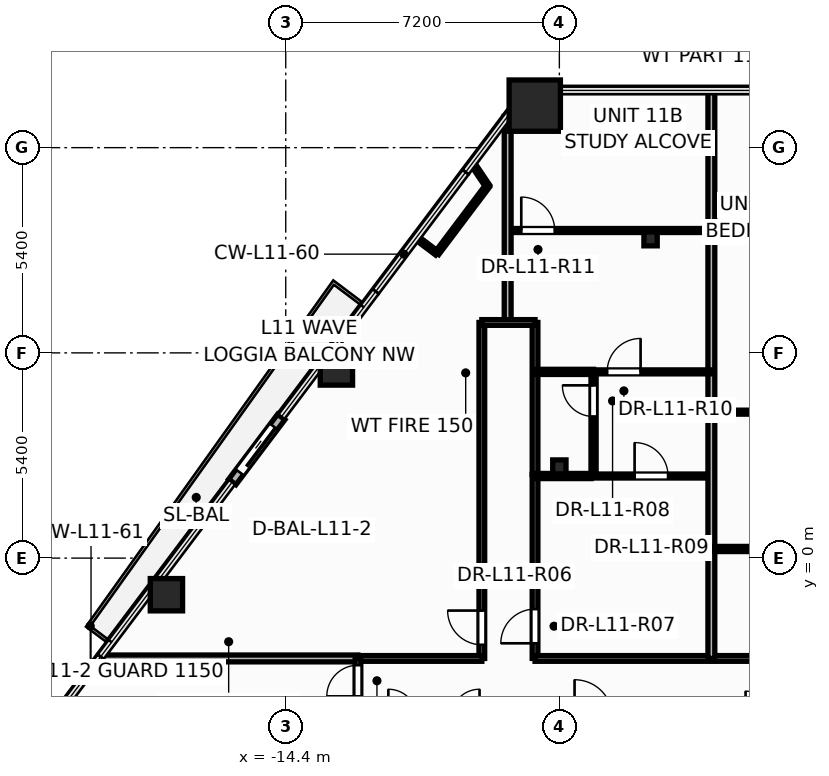
"""IFC4 building model, lengths in metres.
Left out: names, types, materials, properties, quantities, classifications, styles, units other than length and angle.
Written with IfcOpenShell. Run it as: python <this file> out.ifc"""

import sys

from ifc_helpers import new_model, si_unit, direction, frame, frame_2d, origin, origin_2d, place, context, subcontext, project, spatial, rectangle, hollow_rectangle, hollow_circle, i_section, extrude, element, fill, save


model = new_model("IFC4")
c1 = context("Model", 3, precision=1e-05, world=origin(), true_north=direction((0.0, 1.0)))
c2 = subcontext(c1, "Body", "Model", "MODEL_VIEW")
j1 = project(units=[si_unit("LENGTHUNIT", "METRE"), si_unit("PLANEANGLEUNIT", "RADIAN")], contexts=[c1])
p1 = place(None, origin())
s1 = spatial("IfcSite", under=j1, at=p1, CompositionType="ELEMENT")
p2 = place(p1, origin())
s2 = spatial("IfcBuilding", under=s1, at=p2, CompositionType="ELEMENT")
p3 = place(p2, frame((0.0, 0.0, 45.9)))
s3 = spatial("IfcBuildingStorey", under=s2, at=p3, CompositionType="ELEMENT", Elevation=45.9)
p4 = place(p3, frame((-7.847, 11.906, 0.0), z_axis=(0.0, 0.0, 1.0), x_axis=(1.0, 0.0, 0.0)))
e1 = element("IfcColumn", 1, at=p4, inside=s3, PredefinedType="COLUMN", context=c2, shape_type="SweptSolid", body=[
    extrude(hollow_rectangle(XDim=1.35, YDim=1.35, WallThickness=0.065, at=origin_2d()), origin(), (0.0, 0.0, 1.0), 3.6),
])
for number, where, z_axis, x_axis in (
    (2, (-13.066, 4.976, 0.0), (0.0, 0.0, 1.0), (1.0, 0.0, 0.0)),
    (3, (-17.54, -0.963, 0.0), (0.0, 0.0, 1.0), (1.0, 0.0, 0.0)),
):
    element("IfcColumn", number, at=place(p3, frame(where, z_axis=z_axis, x_axis=x_axis)), inside=s3, PredefinedType="COLUMN", context=c2, shape_type="SweptSolid", body=[
        extrude(hollow_circle(Radius=0.425, WallThickness=0.038, at=origin_2d()), origin(), (0.0, 0.0, 1.0), 3.6),
    ])
for number, where, z_axis, x_axis in (
    (4, (-7.2, 2.4, 0.0), (0.0, 0.0, 1.0), (1.0, 0.0, 0.0)),
    (5, (-4.8, 8.4, 0.0), (0.0, 0.0, 1.0), (1.0, 0.0, 0.0)),
):
    element("IfcColumn", number, at=place(p3, frame(where, z_axis=z_axis, x_axis=x_axis)), inside=s3, PredefinedType="COLUMN", context=c2, shape_type="SweptSolid", body=[
        extrude(i_section(OverallWidth=0.35, OverallDepth=0.367, WebThickness=0.025, FlangeThickness=0.032, at=origin_2d()), origin(), (0.0, 0.0, 1.0), 3.6),
    ])
p5 = place(p3, frame((-14.518, 3.713, -0.015), z_axis=(0.0, 0.0, 1.0), x_axis=(-0.601696267697, -0.79872498486, 0.0)))
e6 = element("IfcWall", 6, at=p5, inside=s3, PredefinedType="STANDARD", context=c2, shape_type="SweptSolid", body=[
    extrude(rectangle(XDim=2.14, YDim=0.24, at=frame_2d((1.07, 0.0))), origin(), (0.0, 0.0, 1.0), 2.728),
])
p6 = place(p5, frame((0.32, 0.0, 0.015)))
e7 = element("IfcOpeningElement", 7, at=p6, cuts=e6, PredefinedType="OPENING", context=c2, shape_type="SweptSolid", body=[
    extrude(rectangle(XDim=1.506, YDim=2.204, at=frame_2d((0.75, 1.102))), frame((0.0, 0.13, 0.0), z_axis=(0.0, -1.0, 0.0), x_axis=(1.0, 0.0, 0.0)), (0.0, 0.0, 1.0), 0.26),
])
p7 = place(p3, frame((-9.24, -2.64, 0.0), z_axis=(0.0, 0.0, 1.0), x_axis=(0.0, 1.0, 0.0)))
e8 = element("IfcWall", 8, at=p7, inside=s3, PredefinedType="PARTITIONING", context=c2, shape_type="SweptSolid", body=[
    extrude(rectangle(XDim=8.84, YDim=0.15, at=frame_2d((4.42, 0.0))), origin(), (0.0, 0.0, 1.0), 2.509),
])
p8 = place(p7, frame((0.359, 0.0, 0.0)))
e9 = element("IfcOpeningElement", 9, at=p8, cuts=e8, PredefinedType="OPENING", context=c2, shape_type="SweptSolid", body=[
    extrude(rectangle(XDim=0.906, YDim=2.104, at=frame_2d((0.45, 1.052))), frame((0.0, 0.085, 0.0), z_axis=(0.0, -1.0, 0.0), x_axis=(1.0, 0.0, 0.0)), (0.0, 0.0, 1.0), 0.17),
])
p9 = place(p3, frame((-19.304, -2.64, 0.0), z_axis=(0.0, 0.0, 1.0), x_axis=(1.0, 0.0, 0.0)))
e10 = element("IfcWall", 10, at=p9, inside=s3, PredefinedType="PARTITIONING", context=c2, shape_type="SweptSolid", body=[
    extrude(rectangle(XDim=6.804, YDim=0.18, at=frame_2d((3.402, 0.0))), origin(), (0.0, 0.0, 1.0), 2.713),
])
p10 = place(p3, frame((-8.56, 8.62, 0.0), z_axis=(0.0, 0.0, 1.0), x_axis=(1.0, 0.0, 0.0)))
e11 = element("IfcWall", 11, at=p10, inside=s3, PredefinedType="PARTITIONING", context=c2, shape_type="SweptSolid", body=[
    extrude(rectangle(XDim=5.36, YDim=0.105, at=frame_2d((2.68, 0.0))), origin(), (0.0, 0.0, 1.0), 2.509),
])
p11 = place(p10, frame((0.358, 0.0, 0.0)))
e12 = element("IfcOpeningElement", 12, at=p11, cuts=e11, PredefinedType="OPENING", context=c2, shape_type="SweptSolid", body=[
    extrude(rectangle(XDim=0.886, YDim=2.104, at=frame_2d((0.44, 1.052))), frame((0.0, 0.062, 0.0), z_axis=(0.0, -1.0, 0.0), x_axis=(1.0, 0.0, 0.0)), (0.0, 0.0, 1.0), 0.125),
])
p12 = place(p3, frame((-7.84, -2.64, 0.0), z_axis=(0.0, 0.0, 1.0), x_axis=(0.0, 1.0, 0.0)))
e13 = element("IfcWall", 13, at=p12, inside=s3, PredefinedType="PARTITIONING", context=c2, shape_type="SweptSolid", body=[
    extrude(rectangle(XDim=4.84, YDim=0.15, at=frame_2d((2.42, 0.0))), origin(), (0.0, 0.0, 1.0), 2.509),
])
p13 = place(p12, frame((0.398, 0.0, 0.0)))
e14 = element("IfcOpeningElement", 14, at=p13, cuts=e13, PredefinedType="OPENING", context=c2, shape_type="SweptSolid", body=[
    extrude(rectangle(XDim=0.906, YDim=2.104, at=frame_2d((0.45, 1.052))), frame((0.0, 0.085, 0.0), z_axis=(0.0, -1.0, 0.0), x_axis=(1.0, 0.0, 0.0)), (0.0, 0.0, 1.0), 0.17),
])
p14 = place(p3, frame((-7.84, -2.64, 0.0), z_axis=(0.0, 0.0, 1.0), x_axis=(1.0, 0.0, 0.0)))
e15 = element("IfcWall", 15, at=p14, inside=s3, PredefinedType="PARTITIONING", context=c2, shape_type="SweptSolid", body=[
    extrude(rectangle(XDim=7.0, YDim=0.15, at=frame_2d((3.5, 0.0))), origin(), (0.0, 0.0, 1.0), 2.325),
])
p15 = place(p3, frame((-3.2, 3.8, 0.0), z_axis=(0.0, 0.0, 1.0), x_axis=(0.0, 1.0, 0.0)))
e16 = element("IfcWall", 16, at=p15, inside=s3, PredefinedType="PARTITIONING", context=c2, shape_type="SweptSolid", body=[
    extrude(rectangle(XDim=8.506, YDim=0.18, at=frame_2d((4.253, 0.0))), origin(), (0.0, 0.0, 1.0), 2.509),
])
p16 = place(p3, frame((-12.5, -2.64, 0.0), z_axis=(0.0, 0.0, 1.0), x_axis=(1.0, 0.0, 0.0)))
e17 = element("IfcWall", 17, at=p16, inside=s3, PredefinedType="PARTITIONING", context=c2, shape_type="SweptSolid", body=[
    extrude(rectangle(XDim=3.26, YDim=0.15, at=frame_2d((1.63, 0.0))), origin(), (0.0, 0.0, 1.0), 3.35),
])
p17 = place(p3, frame((-6.36, 2.16, 0.0), z_axis=(0.0, 0.0, 1.0), x_axis=(1.0, 0.0, 0.0)))
e18 = element("IfcWall", 18, at=p17, inside=s3, PredefinedType="PARTITIONING", context=c2, shape_type="SweptSolid", body=[
    extrude(rectangle(XDim=3.16, YDim=0.105, at=frame_2d((1.58, 0.0))), origin(), (0.0, 0.0, 1.0), 2.325),
])
p18 = place(p17, frame((1.14, 0.0, 0.0)))
e19 = element("IfcOpeningElement", 19, at=p18, cuts=e18, PredefinedType="OPENING", context=c2, shape_type="SweptSolid", body=[
    extrude(rectangle(XDim=0.886, YDim=2.104, at=frame_2d((0.44, 1.052))), frame((0.0, 0.062, 0.0), z_axis=(0.0, -1.0, 0.0), x_axis=(1.0, 0.0, 0.0)), (0.0, 0.0, 1.0), 0.125),
])
p19 = place(p3, frame((-6.3, 4.9, 0.0), z_axis=(0.0, 0.0, 1.0), x_axis=(1.0, 0.0, 0.0)))
e20 = element("IfcWall", 20, at=p19, inside=s3, PredefinedType="PARTITIONING", context=c2, shape_type="SweptSolid", body=[
    extrude(rectangle(XDim=3.1, YDim=0.105, at=frame_2d((1.55, 0.0))), origin(), (0.0, 0.0, 1.0), 2.509),
])
p20 = place(p19, frame((0.358, 0.0, 0.0)))
e21 = element("IfcOpeningElement", 21, at=p20, cuts=e20, PredefinedType="OPENING", context=c2, shape_type="SweptSolid", body=[
    extrude(rectangle(XDim=0.886, YDim=2.104, at=frame_2d((0.44, 1.052))), frame((0.0, 0.062, 0.0), z_axis=(0.0, -1.0, 0.0), x_axis=(1.0, 0.0, 0.0)), (0.0, 0.0, 1.0), 0.125),
])
p21 = place(p3, frame((-8.56, 6.2, 0.0), z_axis=(0.0, 0.0, 1.0), x_axis=(0.0, 1.0, 0.0)))
e22 = element("IfcWall", 22, at=p21, inside=s3, PredefinedType="PARTITIONING", context=c2, shape_type="SweptSolid", body=[
    extrude(rectangle(XDim=5.425, YDim=0.18, at=frame_2d((2.712, 0.0))), origin(), (0.0, 0.0, 1.0), 2.509),
])
p22 = place(p3, frame((-3.2, -2.64, 0.0), z_axis=(0.0, 0.0, 1.0), x_axis=(0.0, 1.0, 0.0)))
e23 = element("IfcWall", 23, at=p22, inside=s3, PredefinedType="PARTITIONING", context=c2, shape_type="SweptSolid", body=[
    extrude(rectangle(XDim=6.438, YDim=0.18, at=frame_2d((3.219, 0.0))), origin(), (0.0, 0.0, 1.0), 2.325),
])
p23 = place(p3, frame((-7.84, 2.202, 0.0), z_axis=(0.0, 0.0, 1.0), x_axis=(0.0, 1.0, 0.0)))
e24 = element("IfcWall", 24, at=p23, inside=s3, PredefinedType="PARTITIONING", context=c2, shape_type="SweptSolid", body=[
    extrude(rectangle(XDim=3.998, YDim=0.15, at=frame_2d((1.999, 0.0))), origin(), (0.0, 0.0, 1.0), 2.509),
])
p24 = place(p3, frame((-6.3, 2.16, 0.0), z_axis=(0.0, 0.0, 1.0), x_axis=(0.0, 1.0, 0.0)))
e25 = element("IfcWall", 25, at=p24, inside=s3, PredefinedType="PARTITIONING", context=c2, shape_type="SweptSolid", body=[
    extrude(rectangle(XDim=2.74, YDim=0.135, at=frame_2d((1.37, 0.0))), origin(), (0.0, 0.0, 1.0), 2.325),
])
p25 = place(p24, frame((1.566, 0.0, 0.0)))
e26 = element("IfcOpeningElement", 26, at=p25, cuts=e25, PredefinedType="OPENING", context=c2, shape_type="SweptSolid", body=[
    extrude(rectangle(XDim=0.826, YDim=2.104, at=frame_2d((0.41, 1.052))), frame((0.0, 0.078, 0.0), z_axis=(0.0, -1.0, 0.0), x_axis=(1.0, 0.0, 0.0)), (0.0, 0.0, 1.0), 0.155),
])
p26 = place(p3, frame((-3.2, 0.24, 0.0), z_axis=(0.0, 0.0, 1.0), x_axis=(1.0, 0.0, 0.0)))
e27 = element("IfcWall", 27, at=p26, inside=s3, PredefinedType="PARTITIONING", context=c2, shape_type="SweptSolid", body=[
    extrude(rectangle(XDim=2.3, YDim=0.135, at=frame_2d((1.15, 0.0))), origin(), (0.0, 0.0, 1.0), 3.35),
])
p27 = place(p3, frame((-3.2, 3.84, 0.0), z_axis=(0.0, 0.0, 1.0), x_axis=(1.0, 0.0, 0.0)))
e28 = element("IfcWall", 28, at=p27, inside=s3, PredefinedType="PARTITIONING", context=c2, shape_type="SweptSolid", body=[
    extrude(rectangle(XDim=2.758, YDim=0.105, at=frame_2d((1.379, 0.0))), origin(), (0.0, 0.0, 1.0), 2.919),
])
p28 = place(p3, frame((-9.089, 9.792, 0.0), z_axis=(0.0, 0.0, 1.0), x_axis=(-0.601604540601, -0.798794076548, 0.0)))
e29 = element("IfcWall", 29, at=p28, inside=s3, PredefinedType="PARTITIONING", context=c2, shape_type="SweptSolid", body=[
    extrude(rectangle(XDim=2.214, YDim=0.12, at=frame_2d((1.107, 0.0))), origin(), (0.0, 0.0, 1.0), 3.35),
])
p29 = place(p3, frame((-12.5, -4.24, 0.0), z_axis=(0.0, 0.0, 1.0), x_axis=(0.0, 1.0, 0.0)))
e30 = element("IfcWall", 30, at=p29, inside=s3, PredefinedType="PARTITIONING", context=c2, shape_type="SweptSolid", body=[
    extrude(rectangle(XDim=1.6, YDim=0.15, at=frame_2d((0.8, 0.0))), origin(), (0.0, 0.0, 1.0), 2.325),
])
p30 = place(p29, frame((0.602, 0.0, 0.0)))
e31 = element("IfcOpeningElement", 31, at=p30, cuts=e30, PredefinedType="OPENING", context=c2, shape_type="SweptSolid", body=[
    extrude(rectangle(XDim=0.826, YDim=2.104, at=frame_2d((0.41, 1.052))), frame((0.0, 0.085, 0.0), z_axis=(0.0, -1.0, 0.0), x_axis=(1.0, 0.0, 0.0)), (0.0, 0.0, 1.0), 0.17),
])
p31 = place(p3, frame((-7.84, 2.16, 0.0), z_axis=(0.0, 0.0, 1.0), x_axis=(1.0, 0.0, 0.0)))
e32 = element("IfcWall", 32, at=p31, inside=s3, PredefinedType="PARTITIONING", context=c2, shape_type="SweptSolid", body=[
    extrude(rectangle(XDim=1.478, YDim=0.135, at=frame_2d((0.739, 0.0))), origin(), (0.0, 0.0, 1.0), 2.325),
])
p32 = place(p3, frame((-7.84, 4.9, 0.0), z_axis=(0.0, 0.0, 1.0), x_axis=(1.0, 0.0, 0.0)))
e33 = element("IfcWall", 33, at=p32, inside=s3, PredefinedType="PARTITIONING", context=c2, shape_type="SweptSolid", body=[
    extrude(rectangle(XDim=1.54, YDim=0.135, at=frame_2d((0.77, 0.0))), origin(), (0.0, 0.0, 1.0), 2.509),
])
p33 = place(p3, frame((-9.24, 6.2, 0.0), z_axis=(0.0, 0.0, 1.0), x_axis=(1.0, 0.0, 0.0)))
e34 = element("IfcWall", 34, at=p33, inside=s3, PredefinedType="PARTITIONING", context=c2, shape_type="SweptSolid", body=[
    extrude(rectangle(XDim=1.4, YDim=0.15, at=frame_2d((0.7, 0.0))), origin(), (0.0, 0.0, 1.0), 3.35),
])
p34 = place(p3, frame((-9.485, 10.379, 0.0), z_axis=(0.0, 0.0, 1.0), x_axis=(0.559064577703, -0.82912411493, 0.0)))
e35 = element("IfcWall", 35, at=p34, inside=s3, PredefinedType="PARTITIONING", context=c2, shape_type="SweptSolid", body=[
    extrude(rectangle(XDim=0.709, YDim=0.12, at=frame_2d((0.354, 0.0))), origin(), (0.0, 0.0, 1.0), 2.713),
])
p35 = place(p3, frame((-10.421, 8.023, 0.0), z_axis=(0.0, 0.0, 1.0), x_axis=(-0.798905778506, 0.601456197133, 0.0)))
e36 = element("IfcWall", 36, at=p35, inside=s3, PredefinedType="PARTITIONING", context=c2, shape_type="SweptSolid", body=[
    extrude(rectangle(XDim=0.67, YDim=0.12, at=frame_2d((0.335, 0.0))), origin(), (0.0, 0.0, 1.0), 2.713),
])
p36 = place(p6, origin())
e37 = element("IfcDoor", 37, at=p36, inside=s3, OperationType="SLIDING_TO_RIGHT", PredefinedType="DOOR", context=c2, shape_type="SweptSolid", body=[
    extrude(rectangle(XDim=1.5, YDim=2.2, at=frame_2d((0.75, 1.1))), frame((0.0, 0.025, 0.0), z_axis=(0.0, -1.0, 0.0), x_axis=(1.0, 0.0, 0.0)), (0.0, 0.0, 1.0), 0.05),
])
fill(e7, e37)
p37 = place(p30, origin())
e38 = element("IfcDoor", 38, at=p37, inside=s3, OperationType="SINGLE_SWING_LEFT", PredefinedType="DOOR", context=c2, shape_type="SweptSolid", body=[
    extrude(rectangle(XDim=0.82, YDim=2.1, at=frame_2d((0.41, 1.05))), frame((0.0, 0.025, 0.0), z_axis=(0.0, -1.0, 0.0), x_axis=(1.0, 0.0, 0.0)), (0.0, 0.0, 1.0), 0.05),
])
fill(e31, e38)
p38 = place(p8, origin())
e39 = element("IfcDoor", 39, at=p38, inside=s3, OperationType="SINGLE_SWING_RIGHT", PredefinedType="DOOR", context=c2, shape_type="SweptSolid", body=[
    extrude(rectangle(XDim=0.9, YDim=2.1, at=frame_2d((0.45, 1.05))), frame((0.0, 0.025, 0.0), z_axis=(0.0, -1.0, 0.0), x_axis=(1.0, 0.0, 0.0)), (0.0, 0.0, 1.0), 0.05),
])
fill(e9, e39)
p39 = place(p13, origin())
e40 = element("IfcDoor", 40, at=p39, inside=s3, OperationType="SINGLE_SWING_LEFT", PredefinedType="DOOR", context=c2, shape_type="SweptSolid", body=[
    extrude(rectangle(XDim=0.9, YDim=2.1, at=frame_2d((0.45, 1.05))), frame((0.0, 0.025, 0.0), z_axis=(0.0, -1.0, 0.0), x_axis=(1.0, 0.0, 0.0)), (0.0, 0.0, 1.0), 0.05),
])
fill(e14, e40)
p40 = place(p25, origin())
e41 = element("IfcDoor", 41, at=p40, inside=s3, OperationType="SINGLE_SWING_RIGHT", PredefinedType="DOOR", context=c2, shape_type="SweptSolid", body=[
    extrude(rectangle(XDim=0.82, YDim=2.1, at=frame_2d((0.41, 1.05))), frame((0.0, 0.025, 0.0), z_axis=(0.0, -1.0, 0.0), x_axis=(1.0, 0.0, 0.0)), (0.0, 0.0, 1.0), 0.05),
])
fill(e26, e41)
p41 = place(p18, origin())
e42 = element("IfcDoor", 42, at=p41, inside=s3, OperationType="SINGLE_SWING_LEFT", PredefinedType="DOOR", context=c2, shape_type="SweptSolid", body=[
    extrude(rectangle(XDim=0.88, YDim=2.1, at=frame_2d((0.44, 1.05))), frame((0.0, 0.025, 0.0), z_axis=(0.0, -1.0, 0.0), x_axis=(1.0, 0.0, 0.0)), (0.0, 0.0, 1.0), 0.05),
])
fill(e19, e42)
p42 = place(p20, origin())
e43 = element("IfcDoor", 43, at=p42, inside=s3, OperationType="SINGLE_SWING_RIGHT", PredefinedType="DOOR", context=c2, shape_type="SweptSolid", body=[
    extrude(rectangle(XDim=0.88, YDim=2.1, at=frame_2d((0.44, 1.05))), frame((0.0, 0.025, 0.0), z_axis=(0.0, -1.0, 0.0), x_axis=(1.0, 0.0, 0.0)), (0.0, 0.0, 1.0), 0.05),
])
fill(e21, e43)
p43 = place(p11, origin())
e44 = element("IfcDoor", 44, at=p43, inside=s3, OperationType="SINGLE_SWING_LEFT", PredefinedType="DOOR", context=c2, shape_type="SweptSolid", body=[
    extrude(rectangle(XDim=0.88, YDim=2.1, at=frame_2d((0.44, 1.05))), frame((0.0, 0.025, 0.0), z_axis=(0.0, -1.0, 0.0), x_axis=(1.0, 0.0, 0.0)), (0.0, 0.0, 1.0), 0.05),
])
fill(e12, e44)
save(model, sys.argv[1])
